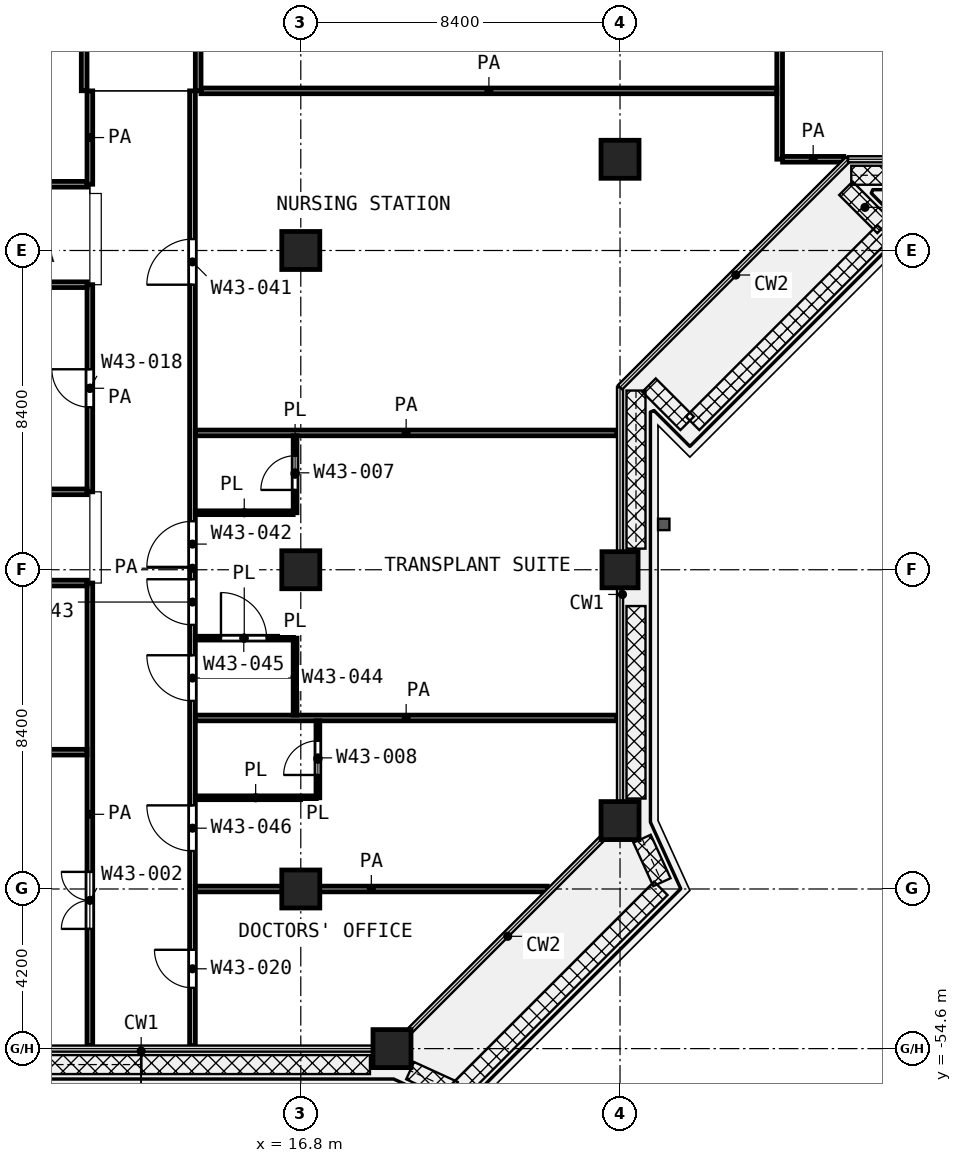
"""IFC4 building model, lengths in metres.
Left out: names, types, materials, properties, quantities, classifications, styles, units other than length and angle.
Written with IfcOpenShell. Run it as: python <this file> out.ifc"""

import sys

from ifc_helpers import new_model, si_unit, direction, frame, frame_2d, origin, origin_2d, place, context, subcontext, project, spatial, rectangle, extrude, element, fill, save


model = new_model("IFC4")
c1 = context("Model", 3, precision=1e-05, world=origin(), true_north=direction((0.0, 1.0)))
c2 = subcontext(c1, "Body", "Model", "MODEL_VIEW")
j1 = project(units=[si_unit("LENGTHUNIT", "METRE"), si_unit("PLANEANGLEUNIT", "RADIAN")], contexts=[c1])
p1 = place(None, origin())
s1 = spatial("IfcSite", under=j1, at=p1, CompositionType="ELEMENT")
p2 = place(p1, origin())
s2 = spatial("IfcBuilding", under=s1, at=p2, CompositionType="ELEMENT")
p3 = place(p2, frame((0.0, 0.0, 187.8)))
s3 = spatial("IfcBuildingStorey", under=s2, at=p3, CompositionType="ELEMENT", Elevation=187.8)
for number, where, z_axis, x_axis in (
    (1, (25.2, -31.2, 0.0), (0.0, 0.0, 1.0), (1.0, 0.0, 0.0)),
    (2, (16.8, -33.6, 0.0), (0.0, 0.0, 1.0), (1.0, 0.0, 0.0)),
    (3, (16.8, -42.0, 0.0), (0.0, 0.0, 1.0), (1.0, 0.0, 0.0)),
):
    element("IfcColumn", number, at=place(p3, frame(where, z_axis=z_axis, x_axis=x_axis)), inside=s3, PredefinedType="COLUMN", context=c2, shape_type="SweptSolid", body=[
        extrude(rectangle(XDim=1.0, YDim=1.0, at=origin_2d()), origin(), (0.0, 0.0, 1.0), 4.2),
    ])
p4 = place(p3, frame((25.2, -42.0, 0.0), z_axis=(0.0, 0.0, 1.0), x_axis=(1.0, 0.0, 0.0)))
e4 = element("IfcColumn", 4, at=p4, inside=s3, PredefinedType="COLUMN", context=c2, shape_type="SweptSolid", body=[
    extrude(rectangle(XDim=0.95, YDim=0.95, at=origin_2d()), origin(), (0.0, 0.0, 1.0), 4.2),
])
for number, where, z_axis, x_axis in (
    (5, (25.2, -48.6, 0.0), (0.0, 0.0, 1.0), (1.0, 0.0, 0.0)),
    (6, (16.8, -50.4, 0.0), (0.0, 0.0, 1.0), (1.0, 0.0, 0.0)),
    (7, (19.2, -54.6, 0.0), (0.0, 0.0, 1.0), (1.0, 0.0, 0.0)),
):
    element("IfcColumn", number, at=place(p3, frame(where, z_axis=z_axis, x_axis=x_axis)), inside=s3, PredefinedType="COLUMN", context=c2, shape_type="SweptSolid", body=[
        extrude(rectangle(XDim=1.0, YDim=1.0, at=origin_2d()), origin(), (0.0, 0.0, 1.0), 4.2),
    ])
p5 = place(p3, frame((14.025, -48.0, 0.0), z_axis=(0.0, 0.0, 1.0), x_axis=(1.0, 0.0, 0.0)))
e8 = element("IfcWall", 8, at=p5, inside=s3, PredefinedType="PARTITIONING", context=c2, shape_type="SweptSolid", body=[
    extrude(rectangle(XDim=3.175, YDim=0.1, at=frame_2d((1.587, 0.0))), origin(), (0.0, 0.0, 1.0), 3.6),
])
p6 = place(p3, frame((14.025, -43.8, 0.0), z_axis=(0.0, 0.0, 1.0), x_axis=(1.0, 0.0, 0.0)))
e9 = element("IfcWall", 9, at=p6, inside=s3, PredefinedType="PARTITIONING", context=c2, shape_type="SweptSolid", body=[
    extrude(rectangle(XDim=2.575, YDim=0.1, at=frame_2d((1.288, 0.0))), origin(), (0.0, 0.0, 1.0), 3.6),
])
p7 = place(p6, frame((0.675, 0.0, 0.0)))
e10 = element("IfcOpeningElement", 10, at=p7, cuts=e9, PredefinedType="OPENING", context=c2, shape_type="SweptSolid", body=[
    extrude(rectangle(XDim=1.2, YDim=2.1, at=frame_2d((0.6, 1.05))), frame((0.0, 0.06, 0.0), z_axis=(0.0, -1.0, 0.0), x_axis=(1.0, 0.0, 0.0)), (0.0, 0.0, 1.0), 0.12),
])
p8 = place(p3, frame((14.025, -40.5, 0.0), z_axis=(0.0, 0.0, 1.0), x_axis=(1.0, 0.0, 0.0)))
e11 = element("IfcWall", 11, at=p8, inside=s3, PredefinedType="PARTITIONING", context=c2, shape_type="SweptSolid", body=[
    extrude(rectangle(XDim=2.575, YDim=0.1, at=frame_2d((1.288, 0.0))), origin(), (0.0, 0.0, 1.0), 3.6),
])
p9 = place(p3, frame((16.65, -45.825, 0.0), z_axis=(0.0, 0.0, 1.0), x_axis=(0.0, 1.0, 0.0)))
e12 = element("IfcWall", 12, at=p9, inside=s3, PredefinedType="PARTITIONING", context=c2, shape_type="SweptSolid", body=[
    extrude(rectangle(XDim=2.025, YDim=0.1, at=frame_2d((1.012, 0.0))), origin(), (0.0, 0.0, 1.0), 3.6),
])
p10 = place(p3, frame((16.65, -40.5, 0.0), z_axis=(0.0, 0.0, 1.0), x_axis=(0.0, 1.0, 0.0)))
e13 = element("IfcWall", 13, at=p10, inside=s3, PredefinedType="PARTITIONING", context=c2, shape_type="SweptSolid", body=[
    extrude(rectangle(XDim=2.025, YDim=0.1, at=frame_2d((1.012, 0.0))), origin(), (0.0, 0.0, 1.0), 3.6),
])
p11 = place(p10, frame((0.6, 0.0, 0.0)))
e14 = element("IfcOpeningElement", 14, at=p11, cuts=e13, PredefinedType="OPENING", context=c2, shape_type="SweptSolid", body=[
    extrude(rectangle(XDim=0.9, YDim=2.1, at=frame_2d((0.45, 1.05))), frame((0.0, 0.06, 0.0), z_axis=(0.0, -1.0, 0.0), x_axis=(1.0, 0.0, 0.0)), (0.0, 0.0, 1.0), 0.12),
])
p12 = place(p3, frame((17.25, -48.0, 0.0), z_axis=(0.0, 0.0, 1.0), x_axis=(0.0, 1.0, 0.0)))
e15 = element("IfcWall", 15, at=p12, inside=s3, PredefinedType="PARTITIONING", context=c2, shape_type="SweptSolid", body=[
    extrude(rectangle(XDim=2.025, YDim=0.1, at=frame_2d((1.012, 0.0))), origin(), (0.0, 0.0, 1.0), 3.6),
])
p13 = place(p12, frame((0.6, 0.0, 0.0)))
e16 = element("IfcOpeningElement", 16, at=p13, cuts=e15, PredefinedType="OPENING", context=c2, shape_type="SweptSolid", body=[
    extrude(rectangle(XDim=0.9, YDim=2.1, at=frame_2d((0.45, 1.05))), frame((0.0, 0.06, 0.0), z_axis=(0.0, -1.0, 0.0), x_axis=(1.0, 0.0, 0.0)), (0.0, 0.0, 1.0), 0.12),
])
p14 = place(p3, frame((14.025, -50.4, 0.0), z_axis=(0.0, 0.0, 1.0), x_axis=(1.0, 0.0, 0.0)))
e17 = element("IfcWall", 17, at=p14, inside=s3, PredefinedType="PARTITIONING", context=c2, shape_type="SweptSolid", body=[
    extrude(rectangle(XDim=9.262, YDim=0.15, at=frame_2d((4.631, 0.0))), origin(), (0.0, 0.0, 1.0), 3.6),
])
p15 = place(p3, frame((0.08, -46.8, 0.0), z_axis=(0.0, 0.0, 1.0), x_axis=(1.0, 0.0, 0.0)))
e18 = element("IfcWall", 18, at=p15, inside=s3, PredefinedType="PARTITIONING", context=c2, shape_type="SweptSolid", body=[
    extrude(rectangle(XDim=11.095, YDim=0.15, at=frame_2d((5.547, 0.0))), origin(), (0.0, 0.0, 1.0), 3.6),
])
p16 = place(p3, frame((14.025, -45.9, 0.0), z_axis=(0.0, 0.0, 1.0), x_axis=(1.0, 0.0, 0.0)))
e19 = element("IfcWall", 19, at=p16, inside=s3, PredefinedType="PARTITIONING", context=c2, shape_type="SweptSolid", body=[
    extrude(rectangle(XDim=11.095, YDim=0.15, at=frame_2d((5.548, 0.0))), origin(), (0.0, 0.0, 1.0), 3.6),
])
p17 = place(p3, frame((2.327, -42.35, 0.0), z_axis=(0.0, 0.0, 1.0), x_axis=(1.0, 0.0, 0.0)))
e20 = element("IfcWall", 20, at=p17, inside=s3, PredefinedType="PARTITIONING", context=c2, shape_type="SweptSolid", body=[
    extrude(rectangle(XDim=8.848, YDim=0.15, at=frame_2d((4.424, 0.0))), origin(), (0.0, 0.0, 1.0), 3.6),
])
p18 = place(p17, frame((3.924, 0.0, 0.0)))
e21 = element("IfcOpeningElement", 21, at=p18, cuts=e20, PredefinedType="OPENING", context=c2, shape_type="SweptSolid", body=[
    extrude(rectangle(XDim=1.0, YDim=2.1, at=frame_2d((0.5, 1.05))), frame((0.0, 0.085, 0.0), z_axis=(0.0, -1.0, 0.0), x_axis=(1.0, 0.0, 0.0)), (0.0, 0.0, 1.0), 0.17),
])
p19 = place(p3, frame((8.65, -39.95, 0.0), z_axis=(0.0, 0.0, 1.0), x_axis=(1.0, 0.0, 0.0)))
e22 = element("IfcWall", 22, at=p19, inside=s3, PredefinedType="PARTITIONING", context=c2, shape_type="SweptSolid", body=[
    extrude(rectangle(XDim=2.525, YDim=0.15, at=frame_2d((1.263, 0.0))), origin(), (0.0, 0.0, 1.0), 3.6),
])
p20 = place(p3, frame((14.025, -38.4, 0.0), z_axis=(0.0, 0.0, 1.0), x_axis=(1.0, 0.0, 0.0)))
e23 = element("IfcWall", 23, at=p20, inside=s3, PredefinedType="PARTITIONING", context=c2, shape_type="SweptSolid", body=[
    extrude(rectangle(XDim=11.095, YDim=0.15, at=frame_2d((5.548, 0.0))), origin(), (0.0, 0.0, 1.0), 3.6),
])
p21 = place(p3, frame((8.9, -34.5, 0.0), z_axis=(0.0, 0.0, 1.0), x_axis=(1.0, 0.0, 0.0)))
e24 = element("IfcWall", 24, at=p21, inside=s3, PredefinedType="PARTITIONING", context=c2, shape_type="SweptSolid", body=[
    extrude(rectangle(XDim=2.275, YDim=0.15, at=frame_2d((1.138, 0.0))), origin(), (0.0, 0.0, 1.0), 3.6),
])
p22 = place(p3, frame((1.077, -31.857, 0.0), z_axis=(0.0, 0.0, 1.0), x_axis=(1.0, 0.0, 0.0)))
e25 = element("IfcWall", 25, at=p22, inside=s3, PredefinedType="PARTITIONING", context=c2, shape_type="SweptSolid", body=[
    extrude(rectangle(XDim=10.098, YDim=0.15, at=frame_2d((5.049, 0.0))), origin(), (0.0, 0.0, 1.0), 3.6),
])
p23 = place(p22, frame((4.449, 0.0, 0.0)))
e26 = element("IfcOpeningElement", 26, at=p23, cuts=e25, PredefinedType="OPENING", context=c2, shape_type="SweptSolid", body=[
    extrude(rectangle(XDim=1.2, YDim=2.1, at=frame_2d((0.6, 1.05))), frame((0.0, 0.085, 0.0), z_axis=(0.0, -1.0, 0.0), x_axis=(1.0, 0.0, 0.0)), (0.0, 0.0, 1.0), 0.17),
])
p24 = place(p3, frame((29.477, -31.2, 0.0), z_axis=(0.0, 0.0, 1.0), x_axis=(1.0, 0.0, 0.0)))
e27 = element("IfcWall", 27, at=p24, inside=s3, PredefinedType="PARTITIONING", context=c2, shape_type="SweptSolid", body=[
    extrude(rectangle(XDim=1.61, YDim=0.15, at=frame_2d((0.805, 0.0))), origin(), (0.0, 0.0, 1.0), 3.6),
])
p25 = place(p3, frame((14.175, -29.4, 0.0), z_axis=(0.0, 0.0, 1.0), x_axis=(1.0, 0.0, 0.0)))
e28 = element("IfcWall", 28, at=p25, inside=s3, PredefinedType="PARTITIONING", context=c2, shape_type="SweptSolid", body=[
    extrude(rectangle(XDim=15.15, YDim=0.15, at=frame_2d((7.575, 0.0))), origin(), (0.0, 0.0, 1.0), 3.6),
])
p26 = place(p3, frame((11.1, -29.397, 0.0), z_axis=(0.0, 0.0, 1.0), x_axis=(0.0, 1.0, 0.0)))
e29 = element("IfcWall", 29, at=p26, inside=s3, PredefinedType="PARTITIONING", context=c2, shape_type="SweptSolid", body=[
    extrude(rectangle(XDim=4.497, YDim=0.15, at=frame_2d((2.249, 0.0))), origin(), (0.0, 0.0, 1.0), 3.6),
])
p27 = place(p3, frame((11.25, -54.52, 0.0), z_axis=(0.0, 0.0, 1.0), x_axis=(0.0, 1.0, 0.0)))
e30 = element("IfcWall", 30, at=p27, inside=s3, PredefinedType="PARTITIONING", context=c2, shape_type="SweptSolid", body=[
    extrude(rectangle(XDim=12.17, YDim=0.15, at=frame_2d((6.085, 0.0))), origin(), (0.0, 0.0, 1.0), 3.6),
])
p28 = place(p27, frame((3.07, 0.0, 0.0)))
e31 = element("IfcOpeningElement", 31, at=p28, cuts=e30, PredefinedType="OPENING", context=c2, shape_type="SweptSolid", body=[
    extrude(rectangle(XDim=1.5, YDim=2.1, at=frame_2d((0.75, 1.05))), frame((0.0, 0.085, 0.0), z_axis=(0.0, -1.0, 0.0), x_axis=(1.0, 0.0, 0.0)), (0.0, 0.0, 1.0), 0.17),
])
p29 = place(p3, frame((11.25, -39.95, 0.0), z_axis=(0.0, 0.0, 1.0), x_axis=(0.0, 1.0, 0.0)))
e32 = element("IfcWall", 32, at=p29, inside=s3, PredefinedType="PARTITIONING", context=c2, shape_type="SweptSolid", body=[
    extrude(rectangle(XDim=5.45, YDim=0.15, at=frame_2d((2.725, 0.0))), origin(), (0.0, 0.0, 1.0), 3.6),
])
p30 = place(p29, frame((2.225, 0.0, 0.0)))
e33 = element("IfcOpeningElement", 33, at=p30, cuts=e32, PredefinedType="OPENING", context=c2, shape_type="SweptSolid", body=[
    extrude(rectangle(XDim=1.0, YDim=2.1, at=frame_2d((0.5, 1.05))), frame((0.0, 0.085, 0.0), z_axis=(0.0, -1.0, 0.0), x_axis=(1.0, 0.0, 0.0)), (0.0, 0.0, 1.0), 0.17),
])
p31 = place(p3, frame((11.25, -31.857, 0.0), z_axis=(0.0, 0.0, 1.0), x_axis=(0.0, 1.0, 0.0)))
e34 = element("IfcWall", 34, at=p31, inside=s3, PredefinedType="PARTITIONING", context=c2, shape_type="SweptSolid", body=[
    extrude(rectangle(XDim=2.457, YDim=0.15, at=frame_2d((1.229, 0.0))), origin(), (0.0, 0.0, 1.0), 3.6),
])
p32 = place(p3, frame((13.95, -54.52, 0.0), z_axis=(0.0, 0.0, 1.0), x_axis=(0.0, 1.0, 0.0)))
e35 = element("IfcWall", 35, at=p32, inside=s3, PredefinedType="PARTITIONING", context=c2, shape_type="SweptSolid", body=[
    extrude(rectangle(XDim=25.12, YDim=0.15, at=frame_2d((12.56, 0.0))), origin(), (0.0, 0.0, 1.0), 3.6),
])
p33 = place(p32, frame((20.02, 0.0, 0.0)))
e36 = element("IfcOpeningElement", 36, at=p33, cuts=e35, PredefinedType="OPENING", context=c2, shape_type="SweptSolid", body=[
    extrude(rectangle(XDim=1.2, YDim=2.1, at=frame_2d((0.6, 1.05))), frame((0.0, 0.085, 0.0), z_axis=(0.0, -1.0, 0.0), x_axis=(1.0, 0.0, 0.0)), (0.0, 0.0, 1.0), 0.17),
])
p34 = place(p32, frame((12.595, 0.0, 0.0)))
e37 = element("IfcOpeningElement", 37, at=p34, cuts=e35, PredefinedType="OPENING", context=c2, shape_type="SweptSolid", body=[
    extrude(rectangle(XDim=1.2, YDim=2.1, at=frame_2d((0.6, 1.05))), frame((0.0, 0.085, 0.0), z_axis=(0.0, -1.0, 0.0), x_axis=(1.0, 0.0, 0.0)), (0.0, 0.0, 1.0), 0.17),
])
p35 = place(p32, frame((11.07, 0.0, 0.0)))
e38 = element("IfcOpeningElement", 38, at=p35, cuts=e35, PredefinedType="OPENING", context=c2, shape_type="SweptSolid", body=[
    extrude(rectangle(XDim=1.2, YDim=2.1, at=frame_2d((0.6, 1.05))), frame((0.0, 0.085, 0.0), z_axis=(0.0, -1.0, 0.0), x_axis=(1.0, 0.0, 0.0)), (0.0, 0.0, 1.0), 0.17),
])
p36 = place(p32, frame((9.07, 0.0, 0.0)))
e39 = element("IfcOpeningElement", 39, at=p36, cuts=e35, PredefinedType="OPENING", context=c2, shape_type="SweptSolid", body=[
    extrude(rectangle(XDim=1.2, YDim=2.1, at=frame_2d((0.6, 1.05))), frame((0.0, 0.085, 0.0), z_axis=(0.0, -1.0, 0.0), x_axis=(1.0, 0.0, 0.0)), (0.0, 0.0, 1.0), 0.17),
])
p37 = place(p32, frame((5.12, 0.0, 0.0)))
e40 = element("IfcOpeningElement", 40, at=p37, cuts=e35, PredefinedType="OPENING", context=c2, shape_type="SweptSolid", body=[
    extrude(rectangle(XDim=1.2, YDim=2.1, at=frame_2d((0.6, 1.05))), frame((0.0, 0.085, 0.0), z_axis=(0.0, -1.0, 0.0), x_axis=(1.0, 0.0, 0.0)), (0.0, 0.0, 1.0), 0.17),
])
p38 = place(p32, frame((1.52, 0.0, 0.0)))
e41 = element("IfcOpeningElement", 41, at=p38, cuts=e35, PredefinedType="OPENING", context=c2, shape_type="SweptSolid", body=[
    extrude(rectangle(XDim=1.0, YDim=2.1, at=frame_2d((0.5, 1.05))), frame((0.0, 0.085, 0.0), z_axis=(0.0, -1.0, 0.0), x_axis=(1.0, 0.0, 0.0)), (0.0, 0.0, 1.0), 0.17),
])
p39 = place(p3, frame((14.1, -29.4, 0.0), z_axis=(0.0, 0.0, 1.0), x_axis=(0.0, 1.0, 0.0)))
e42 = element("IfcWall", 42, at=p39, inside=s3, PredefinedType="PARTITIONING", context=c2, shape_type="SweptSolid", body=[
    extrude(rectangle(XDim=4.5, YDim=0.15, at=frame_2d((2.25, 0.0))), origin(), (0.0, 0.0, 1.0), 3.6),
])
p40 = place(p3, frame((29.4, -31.198, 0.0), z_axis=(0.0, 0.0, 1.0), x_axis=(0.0, 1.0, 0.0)))
e43 = element("IfcWall", 43, at=p40, inside=s3, PredefinedType="PARTITIONING", context=c2, shape_type="SweptSolid", body=[
    extrude(rectangle(XDim=17.098, YDim=0.15, at=frame_2d((8.549, 0.0))), origin(), (0.0, 0.0, 1.0), 3.6),
])
p41 = place(p30, origin())
e44 = element("IfcDoor", 44, at=p41, inside=s3, OperationType="SINGLE_SWING_RIGHT", PredefinedType="DOOR", context=c2, shape_type="SweptSolid", body=[
    extrude(rectangle(XDim=1.0, YDim=2.1, at=frame_2d((0.5, 1.05))), frame((0.0, 0.025, 0.0), z_axis=(0.0, -1.0, 0.0), x_axis=(1.0, 0.0, 0.0)), (0.0, 0.0, 1.0), 0.05),
])
fill(e33, e44)
p42 = place(p28, origin())
e45 = element("IfcDoor", 45, at=p42, inside=s3, OperationType="DOUBLE_DOOR_SINGLE_SWING", PredefinedType="DOOR", context=c2, shape_type="SweptSolid", body=[
    extrude(rectangle(XDim=1.5, YDim=2.1, at=frame_2d((0.75, 1.05))), frame((0.0, 0.025, 0.0), z_axis=(0.0, -1.0, 0.0), x_axis=(1.0, 0.0, 0.0)), (0.0, 0.0, 1.0), 0.05),
])
fill(e31, e45)
p43 = place(p33, origin())
e46 = element("IfcDoor", 46, at=p43, inside=s3, OperationType="SINGLE_SWING_LEFT", PredefinedType="DOOR", context=c2, shape_type="SweptSolid", body=[
    extrude(rectangle(XDim=1.2, YDim=2.1, at=frame_2d((0.6, 1.05))), frame((0.0, 0.025, 0.0), z_axis=(0.0, -1.0, 0.0), x_axis=(1.0, 0.0, 0.0)), (0.0, 0.0, 1.0), 0.05),
])
fill(e36, e46)
p44 = place(p34, origin())
e47 = element("IfcDoor", 47, at=p44, inside=s3, OperationType="SINGLE_SWING_LEFT", PredefinedType="DOOR", context=c2, shape_type="SweptSolid", body=[
    extrude(rectangle(XDim=1.2, YDim=2.1, at=frame_2d((0.6, 1.05))), frame((0.0, 0.025, 0.0), z_axis=(0.0, -1.0, 0.0), x_axis=(1.0, 0.0, 0.0)), (0.0, 0.0, 1.0), 0.05),
])
fill(e37, e47)
p45 = place(p35, origin())
e48 = element("IfcDoor", 48, at=p45, inside=s3, OperationType="SINGLE_SWING_RIGHT", PredefinedType="DOOR", context=c2, shape_type="SweptSolid", body=[
    extrude(rectangle(XDim=1.2, YDim=2.1, at=frame_2d((0.6, 1.05))), frame((0.0, 0.025, 0.0), z_axis=(0.0, -1.0, 0.0), x_axis=(1.0, 0.0, 0.0)), (0.0, 0.0, 1.0), 0.05),
])
fill(e38, e48)
p46 = place(p36, origin())
e49 = element("IfcDoor", 49, at=p46, inside=s3, OperationType="SINGLE_SWING_RIGHT", PredefinedType="DOOR", context=c2, shape_type="SweptSolid", body=[
    extrude(rectangle(XDim=1.2, YDim=2.1, at=frame_2d((0.6, 1.05))), frame((0.0, 0.025, 0.0), z_axis=(0.0, -1.0, 0.0), x_axis=(1.0, 0.0, 0.0)), (0.0, 0.0, 1.0), 0.05),
])
fill(e39, e49)
p47 = place(p7, origin())
e50 = element("IfcDoor", 50, at=p47, inside=s3, OperationType="SINGLE_SWING_LEFT", PredefinedType="DOOR", context=c2, shape_type="SweptSolid", body=[
    extrude(rectangle(XDim=1.2, YDim=2.1, at=frame_2d((0.6, 1.05))), frame((0.0, 0.025, 0.0), z_axis=(0.0, -1.0, 0.0), x_axis=(1.0, 0.0, 0.0)), (0.0, 0.0, 1.0), 0.05),
])
fill(e10, e50)
p48 = place(p11, origin())
e51 = element("IfcDoor", 51, at=p48, inside=s3, OperationType="SINGLE_SWING_LEFT", PredefinedType="DOOR", context=c2, shape_type="SweptSolid", body=[
    extrude(rectangle(XDim=0.9, YDim=2.1, at=frame_2d((0.45, 1.05))), frame((0.0, 0.025, 0.0), z_axis=(0.0, -1.0, 0.0), x_axis=(1.0, 0.0, 0.0)), (0.0, 0.0, 1.0), 0.05),
])
fill(e14, e51)
p49 = place(p37, origin())
e52 = element("IfcDoor", 52, at=p49, inside=s3, OperationType="SINGLE_SWING_RIGHT", PredefinedType="DOOR", context=c2, shape_type="SweptSolid", body=[
    extrude(rectangle(XDim=1.2, YDim=2.1, at=frame_2d((0.6, 1.05))), frame((0.0, 0.025, 0.0), z_axis=(0.0, -1.0, 0.0), x_axis=(1.0, 0.0, 0.0)), (0.0, 0.0, 1.0), 0.05),
])
fill(e40, e52)
p50 = place(p13, origin())
e53 = element("IfcDoor", 53, at=p50, inside=s3, OperationType="SINGLE_SWING_LEFT", PredefinedType="DOOR", context=c2, shape_type="SweptSolid", body=[
    extrude(rectangle(XDim=0.9, YDim=2.1, at=frame_2d((0.45, 1.05))), frame((0.0, 0.025, 0.0), z_axis=(0.0, -1.0, 0.0), x_axis=(1.0, 0.0, 0.0)), (0.0, 0.0, 1.0), 0.05),
])
fill(e16, e53)
p51 = place(p38, origin())
e54 = element("IfcDoor", 54, at=p51, inside=s3, OperationType="SINGLE_SWING_RIGHT", PredefinedType="DOOR", context=c2, shape_type="SweptSolid", body=[
    extrude(rectangle(XDim=1.0, YDim=2.1, at=frame_2d((0.5, 1.05))), frame((0.0, 0.025, 0.0), z_axis=(0.0, -1.0, 0.0), x_axis=(1.0, 0.0, 0.0)), (0.0, 0.0, 1.0), 0.05),
])
fill(e41, e54)
save(model, sys.argv[1])
